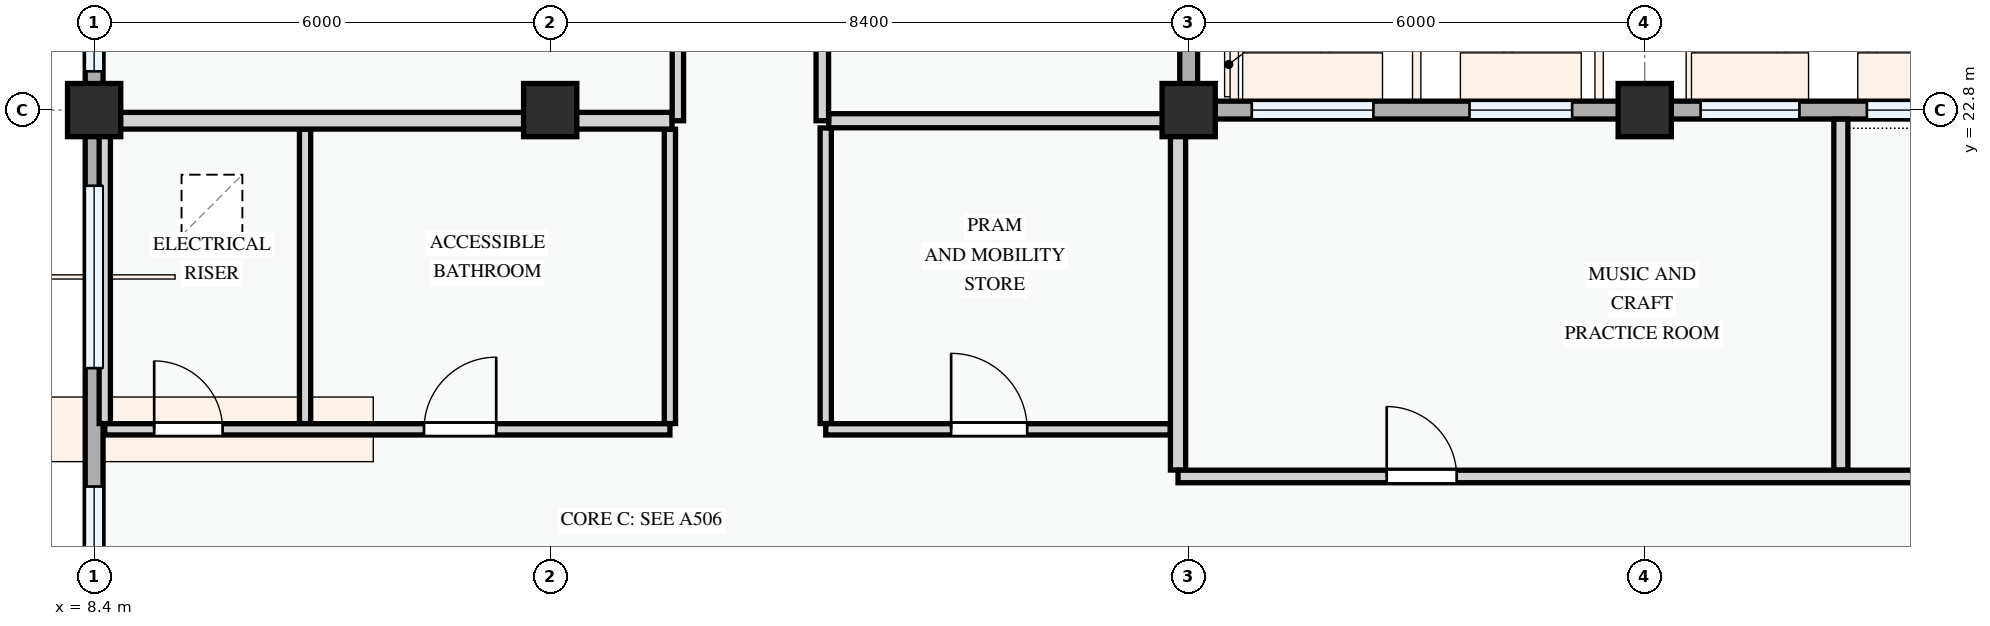
"""IFC4 building model, lengths in metres.
Left out: names, types, materials, properties, quantities, classifications, styles, units other than length and angle.
Written with IfcOpenShell. Run it as: python <this file> out.ifc"""

import sys

from ifc_helpers import new_model, si_unit, direction, frame, frame_2d, origin, origin_2d, place, context, subcontext, project, spatial, rectangle, extrude, element, fill, save


model = new_model("IFC4")
c1 = context("Model", 3, precision=1e-05, world=origin(), true_north=direction((0.0, 1.0)))
c2 = subcontext(c1, "Body", "Model", "MODEL_VIEW")
j1 = project(units=[si_unit("LENGTHUNIT", "METRE"), si_unit("PLANEANGLEUNIT", "RADIAN")], contexts=[c1])
p1 = place(None, origin())
s1 = spatial("IfcSite", under=j1, at=p1, CompositionType="ELEMENT")
p2 = place(p1, origin())
s2 = spatial("IfcBuilding", under=s1, at=p2, CompositionType="ELEMENT")
p3 = place(p2, frame((0.0, 0.0, 4.5)))
s3 = spatial("IfcBuildingStorey", under=s2, at=p3, CompositionType="ELEMENT", Elevation=4.5)
for number, where, z_axis, x_axis in (
    (1, (8.4, 22.8, 0.0), (0.0, 0.0, 1.0), (1.0, 0.0, 0.0)),
    (2, (14.4, 22.8, 0.0), (0.0, 0.0, 1.0), (1.0, 0.0, 0.0)),
    (3, (22.8, 22.8, 0.0), (0.0, 0.0, 1.0), (1.0, 0.0, 0.0)),
    (4, (28.8, 22.8, 0.0), (0.0, 0.0, 1.0), (1.0, 0.0, 0.0)),
):
    element("IfcColumn", number, at=place(p3, frame(where, z_axis=z_axis, x_axis=x_axis)), inside=s3, PredefinedType="COLUMN", context=c2, shape_type="SweptSolid", body=[
        extrude(rectangle(XDim=0.7, YDim=0.7, at=origin_2d()), origin(), (0.0, 0.0, 1.0), 3.6),
    ])
p4 = place(p3, frame((22.8, 22.8, 0.0), z_axis=(0.0, 0.0, 1.0), x_axis=(0.0, 1.0, 0.0)))
e5 = element("IfcWall", 5, at=p4, inside=s3, PredefinedType="STANDARD", context=c2, shape_type="SweptSolid", body=[
    extrude(rectangle(XDim=6.0, YDim=0.235, at=frame_2d((3.0, 0.0))), origin(), (0.0, 0.0, 1.0), 2.875),
])
p5 = place(p4, frame((0.97, 0.0, 0.78)))
e6 = element("IfcOpeningElement", 6, at=p5, cuts=e5, PredefinedType="OPENING", context=c2, shape_type="SweptSolid", body=[
    extrude(rectangle(XDim=1.32, YDim=1.35, at=frame_2d((0.66, 0.675))), frame((0.0, 0.127, 0.0), z_axis=(0.0, -1.0, 0.0), x_axis=(1.0, 0.0, 0.0)), (0.0, 0.0, 1.0), 0.255),
])
p6 = place(p4, frame((3.53, 0.0, 0.78)))
e7 = element("IfcOpeningElement", 7, at=p6, cuts=e5, PredefinedType="OPENING", context=c2, shape_type="SweptSolid", body=[
    extrude(rectangle(XDim=1.68, YDim=1.46, at=frame_2d((0.84, 0.73))), frame((0.0, 0.127, 0.0), z_axis=(0.0, -1.0, 0.0), x_axis=(1.0, 0.0, 0.0)), (0.0, 0.0, 1.0), 0.255),
])
p7 = place(p3, frame((8.4, 28.8, 0.0), z_axis=(0.0, 0.0, 1.0), x_axis=(0.0, -1.0, 0.0)))
e8 = element("IfcWall", 8, at=p7, inside=s3, PredefinedType="STANDARD", context=c2, shape_type="SweptSolid", body=[
    extrude(rectangle(XDim=6.0, YDim=0.235, at=frame_2d((3.0, 0.0))), origin(), (0.0, 0.0, 1.0), 2.875),
])
p8 = place(p7, frame((0.69, 0.0, 0.78)))
e9 = element("IfcOpeningElement", 9, at=p8, cuts=e8, PredefinedType="OPENING", context=c2, shape_type="SweptSolid", body=[
    extrude(rectangle(XDim=1.88, YDim=1.52, at=frame_2d((0.94, 0.76))), frame((0.0, 0.127, 0.0), z_axis=(0.0, -1.0, 0.0), x_axis=(1.0, 0.0, 0.0)), (0.0, 0.0, 1.0), 0.255),
])
p9 = place(p7, frame((3.25, 0.0, 0.78)))
e10 = element("IfcOpeningElement", 10, at=p9, cuts=e8, PredefinedType="OPENING", context=c2, shape_type="SweptSolid", body=[
    extrude(rectangle(XDim=2.24, YDim=1.52, at=frame_2d((1.12, 0.76))), frame((0.0, 0.127, 0.0), z_axis=(0.0, -1.0, 0.0), x_axis=(1.0, 0.0, 0.0)), (0.0, 0.0, 1.0), 0.255),
])
p10 = place(p3, frame((8.4, 22.8, 0.0), z_axis=(0.0, 0.0, 1.0), x_axis=(0.0, -1.0, 0.0)))
e11 = element("IfcWall", 11, at=p10, inside=s3, PredefinedType="STANDARD", context=c2, shape_type="SweptSolid", body=[
    extrude(rectangle(XDim=8.4, YDim=0.235, at=frame_2d((4.2, 0.0))), origin(), (0.0, 0.0, 1.0), 2.725),
])
p11 = place(p10, frame((0.995, 0.0, 0.78)))
e12 = element("IfcOpeningElement", 12, at=p11, cuts=e11, PredefinedType="OPENING", context=c2, shape_type="SweptSolid", body=[
    extrude(rectangle(XDim=2.4, YDim=1.65, at=frame_2d((1.2, 0.825))), frame((0.0, 0.127, 0.0), z_axis=(0.0, -1.0, 0.0), x_axis=(1.0, 0.0, 0.0)), (0.0, 0.0, 1.0), 0.255),
])
p12 = place(p10, frame((4.952, 0.0, 0.78)))
e13 = element("IfcOpeningElement", 13, at=p12, cuts=e11, PredefinedType="OPENING", context=c2, shape_type="SweptSolid", body=[
    extrude(rectangle(XDim=1.42, YDim=1.38, at=frame_2d((0.71, 0.69))), frame((0.0, 0.127, 0.0), z_axis=(0.0, -1.0, 0.0), x_axis=(1.0, 0.0, 0.0)), (0.0, 0.0, 1.0), 0.255),
])
p13 = place(p3, frame((37.2, 22.8, 0.0), z_axis=(0.0, 0.0, 1.0), x_axis=(-1.0, 0.0, 0.0)))
e14 = element("IfcWall", 14, at=p13, inside=s3, PredefinedType="STANDARD", context=c2, shape_type="SweptSolid", body=[
    extrude(rectangle(XDim=8.4, YDim=0.235, at=frame_2d((4.2, 0.0))), origin(), (0.0, 0.0, 1.0), 2.675),
])
p14 = place(p13, frame((0.683, 0.0, 0.78)))
e15 = element("IfcOpeningElement", 15, at=p14, cuts=e14, PredefinedType="OPENING", context=c2, shape_type="SweptSolid", body=[
    extrude(rectangle(XDim=1.9, YDim=1.55, at=frame_2d((0.95, 0.775))), frame((0.0, 0.127, 0.0), z_axis=(0.0, -1.0, 0.0), x_axis=(1.0, 0.0, 0.0)), (0.0, 0.0, 1.0), 0.255),
])
p15 = place(p13, frame((3.278, 0.0, 0.78)))
e16 = element("IfcOpeningElement", 16, at=p15, cuts=e14, PredefinedType="OPENING", context=c2, shape_type="SweptSolid", body=[
    extrude(rectangle(XDim=2.2, YDim=1.5, at=frame_2d((1.1, 0.75))), frame((0.0, 0.127, 0.0), z_axis=(0.0, -1.0, 0.0), x_axis=(1.0, 0.0, 0.0)), (0.0, 0.0, 1.0), 0.255),
])
p16 = place(p13, frame((6.365, 0.0, 0.78)))
e17 = element("IfcOpeningElement", 17, at=p16, cuts=e14, PredefinedType="OPENING", context=c2, shape_type="SweptSolid", body=[
    extrude(rectangle(XDim=1.3, YDim=1.4, at=frame_2d((0.65, 0.7))), frame((0.0, 0.127, 0.0), z_axis=(0.0, -1.0, 0.0), x_axis=(1.0, 0.0, 0.0)), (0.0, 0.0, 1.0), 0.255),
])
p17 = place(p3, frame((28.8, 22.8, 0.0), z_axis=(0.0, 0.0, 1.0), x_axis=(-1.0, 0.0, 0.0)))
e18 = element("IfcWall", 18, at=p17, inside=s3, PredefinedType="STANDARD", context=c2, shape_type="SweptSolid", body=[
    extrude(rectangle(XDim=6.0, YDim=0.235, at=frame_2d((3.0, 0.0))), origin(), (0.0, 0.0, 1.0), 2.775),
])
p18 = place(p17, frame((0.955, 0.0, 0.78)))
e19 = element("IfcOpeningElement", 19, at=p18, cuts=e18, PredefinedType="OPENING", context=c2, shape_type="SweptSolid", body=[
    extrude(rectangle(XDim=1.35, YDim=1.55, at=frame_2d((0.675, 0.775))), frame((0.0, 0.127, 0.0), z_axis=(0.0, -1.0, 0.0), x_axis=(1.0, 0.0, 0.0)), (0.0, 0.0, 1.0), 0.255),
])
p19 = place(p17, frame((3.57, 0.0, 0.78)))
e20 = element("IfcOpeningElement", 20, at=p19, cuts=e18, PredefinedType="OPENING", context=c2, shape_type="SweptSolid", body=[
    extrude(rectangle(XDim=1.6, YDim=1.75, at=frame_2d((0.8, 0.875))), frame((0.0, 0.127, 0.0), z_axis=(0.0, -1.0, 0.0), x_axis=(1.0, 0.0, 0.0)), (0.0, 0.0, 1.0), 0.255),
])
p20 = place(p3, frame((8.54, 18.676, 0.0), z_axis=(0.0, 0.0, 1.0), x_axis=(0.0, 1.0, 0.0)))
e21 = element("IfcWall", 21, at=p20, inside=s3, PredefinedType="PARTITIONING", context=c2, shape_type="SweptSolid", body=[
    extrude(rectangle(XDim=3.872, YDim=0.148, at=frame_2d((1.936, 0.0))), origin(), (0.0, 0.0, 1.0), 2.725),
])
for number, where, z_axis, x_axis in (
    (22, (11.175, 18.676, 0.0), (0.0, 0.0, 1.0), (0.0, 1.0, 0.0)),
    (23, (15.975, 18.676, 0.0), (0.0, 0.0, 1.0), (0.0, 1.0, 0.0)),
):
    element("IfcWall", number, at=place(p3, frame(where, z_axis=z_axis, x_axis=x_axis)), inside=s3, PredefinedType="PARTITIONING", context=c2, shape_type="SweptSolid", body=[
        extrude(rectangle(XDim=3.872, YDim=0.148, at=frame_2d((1.936, 0.0))), origin(), (0.0, 0.0, 1.0), 3.3),
    ])
p21 = place(p3, frame((18.025, 18.676, 0.0), z_axis=(0.0, 0.0, 1.0), x_axis=(0.0, 1.0, 0.0)))
e24 = element("IfcWall", 24, at=p21, inside=s3, PredefinedType="PARTITIONING", context=c2, shape_type="SweptSolid", body=[
    extrude(rectangle(XDim=3.889, YDim=0.148, at=frame_2d((1.945, 0.0))), origin(), (0.0, 0.0, 1.0), 3.3),
])
p22 = place(p3, frame((8.54, 18.6, 0.0), z_axis=(0.0, 0.0, 1.0), x_axis=(1.0, 0.0, 0.0)))
e25 = element("IfcWall", 25, at=p22, inside=s3, PredefinedType="PARTITIONING", context=c2, shape_type="SweptSolid", body=[
    extrude(rectangle(XDim=7.435, YDim=0.148, at=frame_2d((3.718, 0.0))), origin(), (0.0, 0.0, 1.0), 3.3),
])
p23 = place(p22, frame((0.65, 0.0, 0.0)))
e26 = element("IfcOpeningElement", 26, at=p23, cuts=e25, PredefinedType="OPENING", context=c2, shape_type="SweptSolid", body=[
    extrude(rectangle(XDim=0.9, YDim=2.1, at=frame_2d((0.45, 1.05))), frame((0.0, 0.084, 0.0), z_axis=(0.0, -1.0, 0.0), x_axis=(1.0, 0.0, 0.0)), (0.0, 0.0, 1.0), 0.168),
])
p24 = place(p22, frame((4.2, 0.0, 0.0)))
e27 = element("IfcOpeningElement", 27, at=p24, cuts=e25, PredefinedType="OPENING", context=c2, shape_type="SweptSolid", body=[
    extrude(rectangle(XDim=0.95, YDim=2.1, at=frame_2d((0.475, 1.05))), frame((0.0, 0.084, 0.0), z_axis=(0.0, -1.0, 0.0), x_axis=(1.0, 0.0, 0.0)), (0.0, 0.0, 1.0), 0.168),
])
p25 = place(p3, frame((18.025, 18.6, 0.0), z_axis=(0.0, 0.0, 1.0), x_axis=(1.0, 0.0, 0.0)))
e28 = element("IfcWall", 28, at=p25, inside=s3, PredefinedType="PARTITIONING", context=c2, shape_type="SweptSolid", body=[
    extrude(rectangle(XDim=4.533, YDim=0.148, at=frame_2d((2.267, 0.0))), origin(), (0.0, 0.0, 1.0), 3.3),
])
p26 = place(p25, frame((1.65, 0.0, 0.0)))
e29 = element("IfcOpeningElement", 29, at=p26, cuts=e28, PredefinedType="OPENING", context=c2, shape_type="SweptSolid", body=[
    extrude(rectangle(XDim=1.0, YDim=2.15, at=frame_2d((0.5, 1.075))), frame((0.0, 0.084, 0.0), z_axis=(0.0, -1.0, 0.0), x_axis=(1.0, 0.0, 0.0)), (0.0, 0.0, 1.0), 0.168),
])
p27 = place(p3, frame((8.52, 22.66, 0.0), z_axis=(0.0, 0.0, 1.0), x_axis=(1.0, 0.0, 0.0)))
e30 = element("IfcWall", 30, at=p27, inside=s3, PredefinedType="PARTITIONING", context=c2, shape_type="SweptSolid", body=[
    extrude(rectangle(XDim=7.483, YDim=0.22, at=frame_2d((3.742, 0.0))), origin(), (0.0, 0.0, 1.0), 2.675),
])
p28 = place(p3, frame((18.064, 22.66, 0.0), z_axis=(0.0, 0.0, 1.0), x_axis=(1.0, 0.0, 0.0)))
e31 = element("IfcWall", 31, at=p28, inside=s3, PredefinedType="PARTITIONING", context=c2, shape_type="SweptSolid", body=[
    extrude(rectangle(XDim=4.494, YDim=0.185, at=frame_2d((2.247, 0.0))), origin(), (0.0, 0.0, 1.0), 2.675),
])
p29 = place(p3, frame((16.08, 22.66, 0.0), z_axis=(0.0, 0.0, 1.0), x_axis=(0.0, 1.0, 0.0)))
e32 = element("IfcWall", 32, at=p29, inside=s3, PredefinedType="PARTITIONING", context=c2, shape_type="SweptSolid", body=[
    extrude(rectangle(XDim=34.821, YDim=0.15, at=frame_2d((17.41, 0.0))), origin(), (0.0, 0.0, 1.0), 3.3),
])
p30 = place(p29, frame((2.749, 0.0, 0.0)))
e33 = element("IfcOpeningElement", 33, at=p30, cuts=e32, PredefinedType="OPENING", context=c2, shape_type="SweptSolid", body=[
    extrude(rectangle(XDim=0.95, YDim=2.1, at=frame_2d((0.475, 1.05))), frame((0.0, 0.085, 0.0), z_axis=(0.0, -1.0, 0.0), x_axis=(1.0, 0.0, 0.0)), (0.0, 0.0, 1.0), 0.17),
])
p31 = place(p29, frame((9.966, 0.0, 0.0)))
e34 = element("IfcOpeningElement", 34, at=p31, cuts=e32, PredefinedType="OPENING", context=c2, shape_type="SweptSolid", body=[
    extrude(rectangle(XDim=0.95, YDim=2.1, at=frame_2d((0.475, 1.05))), frame((0.0, 0.085, 0.0), z_axis=(0.0, -1.0, 0.0), x_axis=(1.0, 0.0, 0.0)), (0.0, 0.0, 1.0), 0.17),
])
p32 = place(p29, frame((24.343, 0.0, 0.0)))
e35 = element("IfcOpeningElement", 35, at=p32, cuts=e32, PredefinedType="OPENING", context=c2, shape_type="SweptSolid", body=[
    extrude(rectangle(XDim=0.95, YDim=2.1, at=frame_2d((0.475, 1.05))), frame((0.0, 0.085, 0.0), z_axis=(0.0, -1.0, 0.0), x_axis=(1.0, 0.0, 0.0)), (0.0, 0.0, 1.0), 0.17),
])
p33 = place(p29, frame((31.542, 0.0, 0.0)))
e36 = element("IfcOpeningElement", 36, at=p33, cuts=e32, PredefinedType="OPENING", context=c2, shape_type="SweptSolid", body=[
    extrude(rectangle(XDim=0.95, YDim=2.1, at=frame_2d((0.475, 1.05))), frame((0.0, 0.085, 0.0), z_axis=(0.0, -1.0, 0.0), x_axis=(1.0, 0.0, 0.0)), (0.0, 0.0, 1.0), 0.17),
])
p34 = place(p3, frame((17.98, 22.66, 0.0), z_axis=(0.0, 0.0, 1.0), x_axis=(0.0, 1.0, 0.0)))
e37 = element("IfcWall", 37, at=p34, inside=s3, PredefinedType="PARTITIONING", context=c2, shape_type="SweptSolid", body=[
    extrude(rectangle(XDim=34.821, YDim=0.165, at=frame_2d((17.41, 0.0))), origin(), (0.0, 0.0, 1.0), 3.3),
])
p35 = place(p34, frame((2.746, 0.0, 0.0)))
e38 = element("IfcOpeningElement", 38, at=p35, cuts=e37, PredefinedType="OPENING", context=c2, shape_type="SweptSolid", body=[
    extrude(rectangle(XDim=0.96, YDim=2.12, at=frame_2d((0.48, 1.06))), frame((0.0, 0.093, 0.0), z_axis=(0.0, -1.0, 0.0), x_axis=(1.0, 0.0, 0.0)), (0.0, 0.0, 1.0), 0.185),
])
p36 = place(p34, frame((9.965, 0.0, 0.0)))
e39 = element("IfcOpeningElement", 39, at=p36, cuts=e37, PredefinedType="OPENING", context=c2, shape_type="SweptSolid", body=[
    extrude(rectangle(XDim=0.92, YDim=2.1, at=frame_2d((0.46, 1.05))), frame((0.0, 0.093, 0.0), z_axis=(0.0, -1.0, 0.0), x_axis=(1.0, 0.0, 0.0)), (0.0, 0.0, 1.0), 0.185),
])
p37 = place(p34, frame((24.335, 0.0, 0.0)))
e40 = element("IfcOpeningElement", 40, at=p37, cuts=e37, PredefinedType="OPENING", context=c2, shape_type="SweptSolid", body=[
    extrude(rectangle(XDim=0.92, YDim=2.1, at=frame_2d((0.46, 1.05))), frame((0.0, 0.093, 0.0), z_axis=(0.0, -1.0, 0.0), x_axis=(1.0, 0.0, 0.0)), (0.0, 0.0, 1.0), 0.185),
])
p38 = place(p34, frame((31.535, 0.0, 0.0)))
e41 = element("IfcOpeningElement", 41, at=p38, cuts=e37, PredefinedType="OPENING", context=c2, shape_type="SweptSolid", body=[
    extrude(rectangle(XDim=0.92, YDim=2.1, at=frame_2d((0.46, 1.05))), frame((0.0, 0.093, 0.0), z_axis=(0.0, -1.0, 0.0), x_axis=(1.0, 0.0, 0.0)), (0.0, 0.0, 1.0), 0.185),
])
p39 = place(p3, frame((22.66, 18.064, 0.0), z_axis=(0.0, 0.0, 1.0), x_axis=(0.0, 1.0, 0.0)))
e42 = element("IfcWall", 42, at=p39, inside=s3, PredefinedType="PARTITIONING", context=c2, shape_type="SweptSolid", body=[
    extrude(rectangle(XDim=4.676, YDim=0.2, at=frame_2d((2.338, 0.0))), origin(), (0.0, 0.0, 1.0), 2.725),
])
p40 = place(p3, frame((31.38, 18.064, 0.0), z_axis=(0.0, 0.0, 1.0), x_axis=(0.0, 1.0, 0.0)))
e43 = element("IfcWall", 43, at=p40, inside=s3, PredefinedType="PARTITIONING", context=c2, shape_type="SweptSolid", body=[
    extrude(rectangle(XDim=4.616, YDim=0.185, at=frame_2d((2.308, 0.0))), origin(), (0.0, 0.0, 1.0), 3.3),
])
p41 = place(p3, frame((22.66, 17.98, 0.0), z_axis=(0.0, 0.0, 1.0), x_axis=(1.0, 0.0, 0.0)))
e44 = element("IfcWall", 44, at=p41, inside=s3, PredefinedType="PARTITIONING", context=c2, shape_type="SweptSolid", body=[
    extrude(rectangle(XDim=34.88, YDim=0.165, at=frame_2d((17.44, 0.0))), origin(), (0.0, 0.0, 1.0), 3.3),
])
p42 = place(p41, frame((2.746, 0.0, 0.0)))
e45 = element("IfcOpeningElement", 45, at=p42, cuts=e44, PredefinedType="OPENING", context=c2, shape_type="SweptSolid", body=[
    extrude(rectangle(XDim=0.92, YDim=2.1, at=frame_2d((0.46, 1.05))), frame((0.0, 0.093, 0.0), z_axis=(0.0, -1.0, 0.0), x_axis=(1.0, 0.0, 0.0)), (0.0, 0.0, 1.0), 0.185),
])
p43 = place(p41, frame((9.965, 0.0, 0.0)))
e46 = element("IfcOpeningElement", 46, at=p43, cuts=e44, PredefinedType="OPENING", context=c2, shape_type="SweptSolid", body=[
    extrude(rectangle(XDim=0.92, YDim=2.1, at=frame_2d((0.46, 1.05))), frame((0.0, 0.093, 0.0), z_axis=(0.0, -1.0, 0.0), x_axis=(1.0, 0.0, 0.0)), (0.0, 0.0, 1.0), 0.185),
])
p44 = place(p41, frame((24.335, 0.0, 0.0)))
e47 = element("IfcOpeningElement", 47, at=p44, cuts=e44, PredefinedType="OPENING", context=c2, shape_type="SweptSolid", body=[
    extrude(rectangle(XDim=0.96, YDim=2.12, at=frame_2d((0.48, 1.06))), frame((0.0, 0.093, 0.0), z_axis=(0.0, -1.0, 0.0), x_axis=(1.0, 0.0, 0.0)), (0.0, 0.0, 1.0), 0.185),
])
p45 = place(p41, frame((31.535, 0.0, 0.0)))
e48 = element("IfcOpeningElement", 48, at=p45, cuts=e44, PredefinedType="OPENING", context=c2, shape_type="SweptSolid", body=[
    extrude(rectangle(XDim=0.92, YDim=2.1, at=frame_2d((0.46, 1.05))), frame((0.0, 0.093, 0.0), z_axis=(0.0, -1.0, 0.0), x_axis=(1.0, 0.0, 0.0)), (0.0, 0.0, 1.0), 0.185),
])
p46 = place(p9, origin())
e49 = element("IfcWindow", 49, at=p46, inside=s3, PartitioningType="DOUBLE_PANEL_VERTICAL", PredefinedType="WINDOW", context=c2, shape_type="SweptSolid", body=[
    extrude(rectangle(XDim=2.24, YDim=1.52, at=frame_2d((1.12, 0.76))), frame((0.0, 0.03, 0.0), z_axis=(0.0, -1.0, 0.0), x_axis=(1.0, 0.0, 0.0)), (0.0, 0.0, 1.0), 0.06),
])
fill(e10, e49)
p47 = place(p11, origin())
e50 = element("IfcWindow", 50, at=p47, inside=s3, PartitioningType="DOUBLE_PANEL_VERTICAL", PredefinedType="WINDOW", context=c2, shape_type="SweptSolid", body=[
    extrude(rectangle(XDim=2.4, YDim=1.65, at=frame_2d((1.2, 0.825))), frame((0.0, 0.03, 0.0), z_axis=(0.0, -1.0, 0.0), x_axis=(1.0, 0.0, 0.0)), (0.0, 0.0, 1.0), 0.06),
])
fill(e12, e50)
p48 = place(p12, origin())
e51 = element("IfcWindow", 51, at=p48, inside=s3, PartitioningType="SINGLE_PANEL", PredefinedType="WINDOW", context=c2, shape_type="SweptSolid", body=[
    extrude(rectangle(XDim=1.42, YDim=1.38, at=frame_2d((0.71, 0.69))), frame((0.0, 0.03, 0.0), z_axis=(0.0, -1.0, 0.0), x_axis=(1.0, 0.0, 0.0)), (0.0, 0.0, 1.0), 0.06),
])
fill(e13, e51)
p49 = place(p15, origin())
e52 = element("IfcWindow", 52, at=p49, inside=s3, PartitioningType="DOUBLE_PANEL_VERTICAL", PredefinedType="WINDOW", context=c2, shape_type="SweptSolid", body=[
    extrude(rectangle(XDim=2.2, YDim=1.5, at=frame_2d((1.1, 0.75))), frame((0.0, 0.03, 0.0), z_axis=(0.0, -1.0, 0.0), x_axis=(1.0, 0.0, 0.0)), (0.0, 0.0, 1.0), 0.06),
])
fill(e16, e52)
p50 = place(p16, origin())
e53 = element("IfcWindow", 53, at=p50, inside=s3, PartitioningType="SINGLE_PANEL", PredefinedType="WINDOW", context=c2, shape_type="SweptSolid", body=[
    extrude(rectangle(XDim=1.3, YDim=1.4, at=frame_2d((0.65, 0.7))), frame((0.0, 0.03, 0.0), z_axis=(0.0, -1.0, 0.0), x_axis=(1.0, 0.0, 0.0)), (0.0, 0.0, 1.0), 0.06),
])
fill(e17, e53)
p51 = place(p18, origin())
e54 = element("IfcWindow", 54, at=p51, inside=s3, PartitioningType="SINGLE_PANEL", PredefinedType="WINDOW", context=c2, shape_type="SweptSolid", body=[
    extrude(rectangle(XDim=1.35, YDim=1.55, at=frame_2d((0.675, 0.775))), frame((0.0, 0.03, 0.0), z_axis=(0.0, -1.0, 0.0), x_axis=(1.0, 0.0, 0.0)), (0.0, 0.0, 1.0), 0.06),
])
fill(e19, e54)
p52 = place(p19, origin())
e55 = element("IfcWindow", 55, at=p52, inside=s3, PartitioningType="DOUBLE_PANEL_VERTICAL", PredefinedType="WINDOW", context=c2, shape_type="SweptSolid", body=[
    extrude(rectangle(XDim=1.6, YDim=1.75, at=frame_2d((0.8, 0.875))), frame((0.0, 0.03, 0.0), z_axis=(0.0, -1.0, 0.0), x_axis=(1.0, 0.0, 0.0)), (0.0, 0.0, 1.0), 0.06),
])
fill(e20, e55)
p53 = place(p23, origin())
e56 = element("IfcDoor", 56, at=p53, inside=s3, OperationType="SINGLE_SWING_LEFT", PredefinedType="DOOR", context=c2, shape_type="SweptSolid", body=[
    extrude(rectangle(XDim=0.9, YDim=2.1, at=frame_2d((0.45, 1.05))), frame((0.0, 0.025, 0.0), z_axis=(0.0, -1.0, 0.0), x_axis=(1.0, 0.0, 0.0)), (0.0, 0.0, 1.0), 0.05),
])
fill(e26, e56)
p54 = place(p24, origin())
e57 = element("IfcDoor", 57, at=p54, inside=s3, OperationType="SINGLE_SWING_RIGHT", PredefinedType="DOOR", context=c2, shape_type="SweptSolid", body=[
    extrude(rectangle(XDim=0.95, YDim=2.1, at=frame_2d((0.475, 1.05))), frame((0.0, 0.025, 0.0), z_axis=(0.0, -1.0, 0.0), x_axis=(1.0, 0.0, 0.0)), (0.0, 0.0, 1.0), 0.05),
])
fill(e27, e57)
p55 = place(p26, origin())
e58 = element("IfcDoor", 58, at=p55, inside=s3, OperationType="SINGLE_SWING_LEFT", PredefinedType="DOOR", context=c2, shape_type="SweptSolid", body=[
    extrude(rectangle(XDim=1.0, YDim=2.15, at=frame_2d((0.5, 1.075))), frame((0.0, 0.025, 0.0), z_axis=(0.0, -1.0, 0.0), x_axis=(1.0, 0.0, 0.0)), (0.0, 0.0, 1.0), 0.05),
])
fill(e29, e58)
p56 = place(p42, origin())
e59 = element("IfcDoor", 59, at=p56, inside=s3, OperationType="SINGLE_SWING_LEFT", PredefinedType="DOOR", context=c2, shape_type="SweptSolid", body=[
    extrude(rectangle(XDim=0.92, YDim=2.1, at=frame_2d((0.46, 1.05))), frame((0.0, 0.025, 0.0), z_axis=(0.0, -1.0, 0.0), x_axis=(1.0, 0.0, 0.0)), (0.0, 0.0, 1.0), 0.05),
])
fill(e45, e59)
save(model, sys.argv[1])
